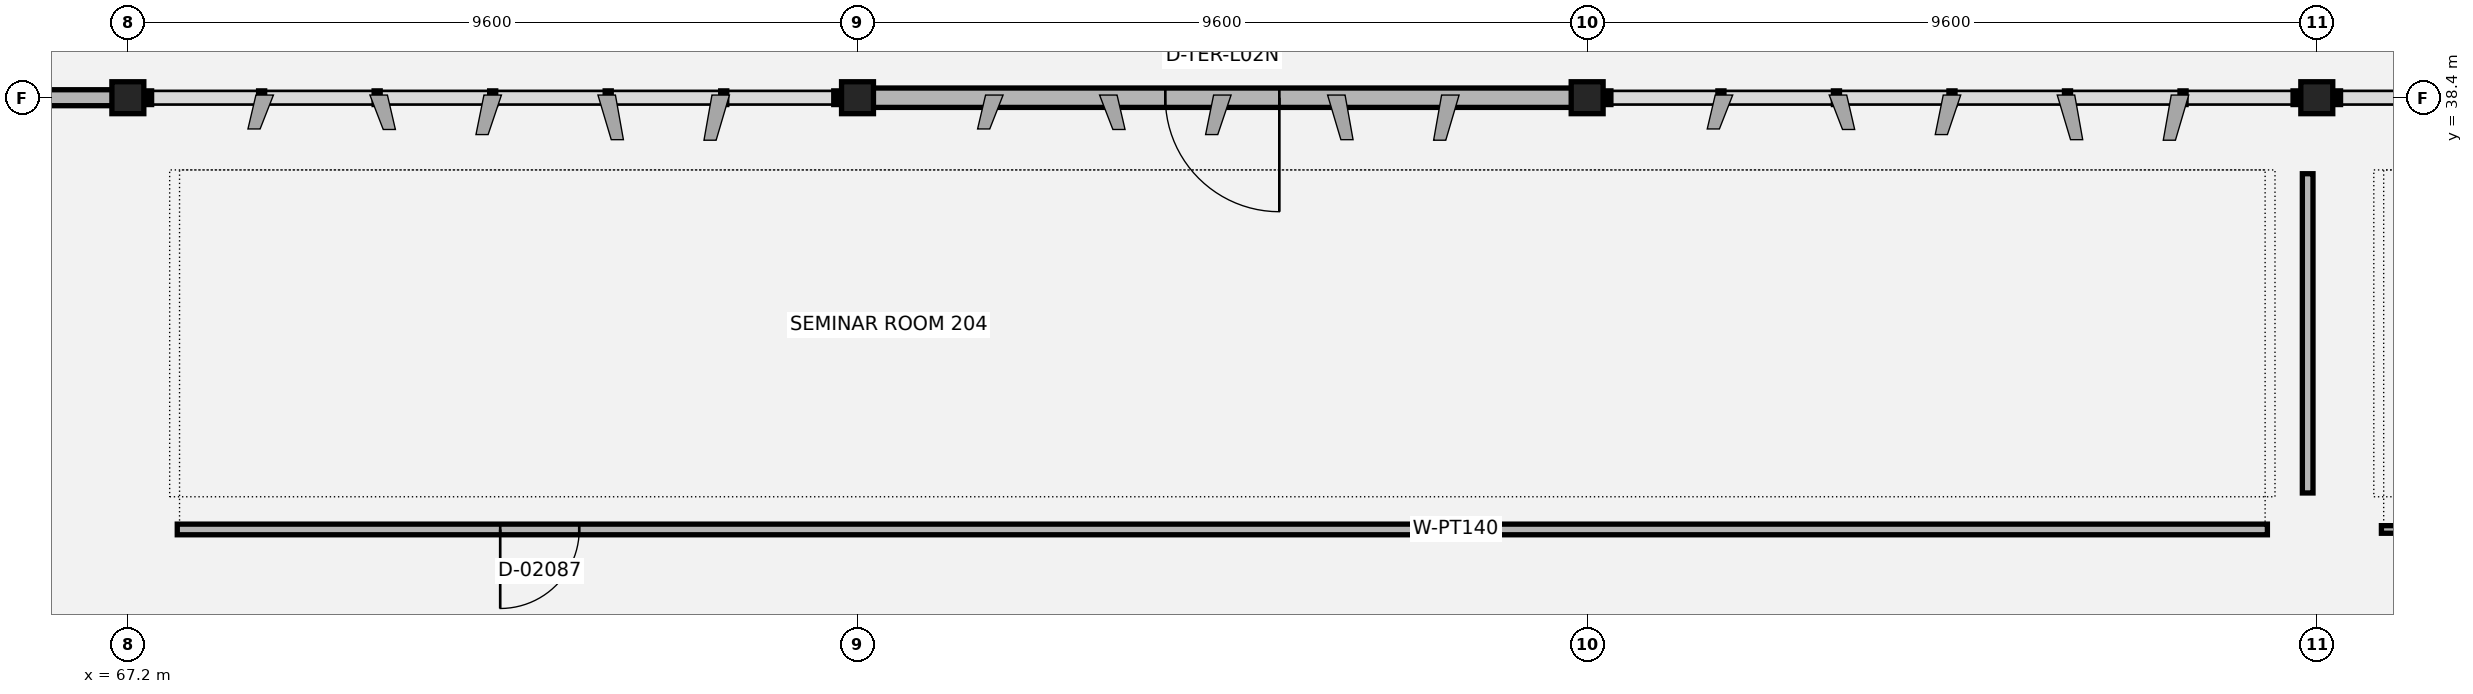
"""IFC4 building model, lengths in metres.
Left out: names, types, materials, properties, quantities, classifications, styles, units other than length and angle.
Written with IfcOpenShell. Run it as: python <this file> out.ifc"""

import sys

from ifc_helpers import new_model, si_unit, direction, frame, frame_2d, origin, origin_2d, place, context, subcontext, project, spatial, rectangle, extrude, element, fill, save


model = new_model("IFC4")
c1 = context("Model", 3, precision=1e-05, world=origin(), true_north=direction((0.0, 1.0)))
c2 = subcontext(c1, "Body", "Model", "MODEL_VIEW")
j1 = project(units=[si_unit("LENGTHUNIT", "METRE"), si_unit("PLANEANGLEUNIT", "RADIAN")], contexts=[c1])
p1 = place(None, origin())
s1 = spatial("IfcSite", under=j1, at=p1, CompositionType="ELEMENT")
p2 = place(p1, origin())
s2 = spatial("IfcBuilding", under=s1, at=p2, CompositionType="ELEMENT")
p3 = place(p2, frame((0.0, 0.0, 10.2)))
s3 = spatial("IfcBuildingStorey", under=s2, at=p3, CompositionType="ELEMENT", Elevation=10.2)
for number, where, z_axis, x_axis in (
    (1, (67.2, 38.4, 0.0), (0.0, 0.0, 1.0), (1.0, 0.0, 0.0)),
    (2, (76.8, 38.4, 0.0), (0.0, 0.0, 1.0), (1.0, 0.0, 0.0)),
    (3, (86.4, 38.4, 0.0), (0.0, 0.0, 1.0), (1.0, 0.0, 0.0)),
    (4, (96.0, 38.4, 0.0), (0.0, 0.0, 1.0), (1.0, 0.0, 0.0)),
):
    element("IfcColumn", number, at=place(p3, frame(where, z_axis=z_axis, x_axis=x_axis)), inside=s3, PredefinedType="COLUMN", context=c2, shape_type="SweptSolid", body=[
        extrude(rectangle(XDim=0.42, YDim=0.42, at=origin_2d()), origin(), (0.0, 0.0, 1.0), 4.2),
    ])
p4 = place(p3, frame((67.0, 38.4, 0.0), z_axis=(0.0, 0.0, 1.0), x_axis=(-1.0, 0.0, 0.0)))
e5 = element("IfcWall", 5, at=p4, inside=s3, PredefinedType="SOLIDWALL", context=c2, shape_type="SweptSolid", body=[
    extrude(rectangle(XDim=4.4, YDim=0.21, at=frame_2d((2.2, 0.0))), origin(), (0.0, 0.0, 1.0), 3.05),
])
p5 = place(p4, frame((1.45, 0.0, 0.9)))
e6 = element("IfcOpeningElement", 6, at=p5, cuts=e5, PredefinedType="OPENING", context=c2, shape_type="SweptSolid", body=[
    extrude(rectangle(XDim=1.5, YDim=1.5, at=frame_2d((0.75, 0.75))), frame((0.0, 0.115, 0.0), z_axis=(0.0, -1.0, 0.0), x_axis=(1.0, 0.0, 0.0)), (0.0, 0.0, 1.0), 0.23),
])
p6 = place(p3, frame((86.2, 38.4, 0.0), z_axis=(0.0, 0.0, 1.0), x_axis=(-1.0, 0.0, 0.0)))
e7 = element("IfcWall", 7, at=p6, inside=s3, PredefinedType="SOLIDWALL", context=c2, shape_type="SweptSolid", body=[
    extrude(rectangle(XDim=9.2, YDim=0.255, at=frame_2d((4.6, 0.0))), origin(), (0.0, 0.0, 1.0), 3.05),
])
p7 = place(p6, frame((3.85, 0.0, 0.0)))
e8 = element("IfcOpeningElement", 8, at=p7, cuts=e7, PredefinedType="OPENING", context=c2, shape_type="SweptSolid", body=[
    extrude(rectangle(XDim=1.5, YDim=2.15, at=frame_2d((0.75, 1.075))), frame((0.0, 0.137, 0.0), z_axis=(0.0, -1.0, 0.0), x_axis=(1.0, 0.0, 0.0)), (0.0, 0.0, 1.0), 0.275),
])
p8 = place(p3, frame((67.85, 32.72, 0.0), z_axis=(0.0, 0.0, 1.0), x_axis=(1.0, 0.0, 0.0)))
e9 = element("IfcWall", 9, at=p8, inside=s3, PredefinedType="PARTITIONING", context=c2, shape_type="SweptSolid", body=[
    extrude(rectangle(XDim=27.5, YDim=0.14, at=frame_2d((13.75, 0.0))), origin(), (0.0, 0.0, 1.0), 3.03),
])
p9 = place(p8, frame((4.249, 0.0, 0.0)))
e10 = element("IfcOpeningElement", 10, at=p9, cuts=e9, PredefinedType="OPENING", context=c2, shape_type="SweptSolid", body=[
    extrude(rectangle(XDim=1.04, YDim=2.15, at=frame_2d((0.52, 1.075))), frame((0.0, 0.08, 0.0), z_axis=(0.0, -1.0, 0.0), x_axis=(1.0, 0.0, 0.0)), (0.0, 0.0, 1.0), 0.16),
])
p10 = place(p3, frame((95.88, 33.2, 0.0), z_axis=(0.0, 0.0, 1.0), x_axis=(0.0, 1.0, 0.0)))
e11 = element("IfcWall", 11, at=p10, inside=s3, PredefinedType="PARTITIONING", context=c2, shape_type="SweptSolid", body=[
    extrude(rectangle(XDim=4.2, YDim=0.14, at=frame_2d((2.1, 0.0))), origin(), (0.0, 0.0, 1.0), 3.03),
])
p11 = place(p3, frame((96.85, 32.72, 0.0), z_axis=(0.0, 0.0, 1.0), x_axis=(1.0, 0.0, 0.0)))
e12 = element("IfcWall", 12, at=p11, inside=s3, PredefinedType="MOVABLE", context=c2, shape_type="SweptSolid", body=[
    extrude(rectangle(XDim=36.5, YDim=0.1, at=frame_2d((18.25, 0.0))), origin(), (0.0, 0.0, 1.0), 3.03),
])
p12 = place(p11, frame((12.482, 0.0, 0.0)))
e13 = element("IfcOpeningElement", 13, at=p12, cuts=e12, PredefinedType="OPENING", context=c2, shape_type="SweptSolid", body=[
    extrude(rectangle(XDim=1.18, YDim=2.15, at=frame_2d((0.59, 1.075))), frame((0.0, 0.06, 0.0), z_axis=(0.0, -1.0, 0.0), x_axis=(1.0, 0.0, 0.0)), (0.0, 0.0, 1.0), 0.12),
])
p13 = place(p7, origin())
e14 = element("IfcDoor", 14, at=p13, inside=s3, OperationType="SINGLE_SWING_LEFT", PredefinedType="DOOR", context=c2, shape_type="SweptSolid", body=[
    extrude(rectangle(XDim=1.5, YDim=2.15, at=frame_2d((0.75, 1.075))), frame((0.0, 0.025, 0.0), z_axis=(0.0, -1.0, 0.0), x_axis=(1.0, 0.0, 0.0)), (0.0, 0.0, 1.0), 0.05),
])
fill(e8, e14)
p14 = place(p9, origin())
e15 = element("IfcDoor", 15, at=p14, inside=s3, OperationType="SINGLE_SWING_RIGHT", PredefinedType="DOOR", context=c2, shape_type="SweptSolid", body=[
    extrude(rectangle(XDim=1.04, YDim=2.15, at=frame_2d((0.52, 1.075))), frame((0.0, 0.025, 0.0), z_axis=(0.0, -1.0, 0.0), x_axis=(1.0, 0.0, 0.0)), (0.0, 0.0, 1.0), 0.05),
])
fill(e10, e15)
save(model, sys.argv[1])
